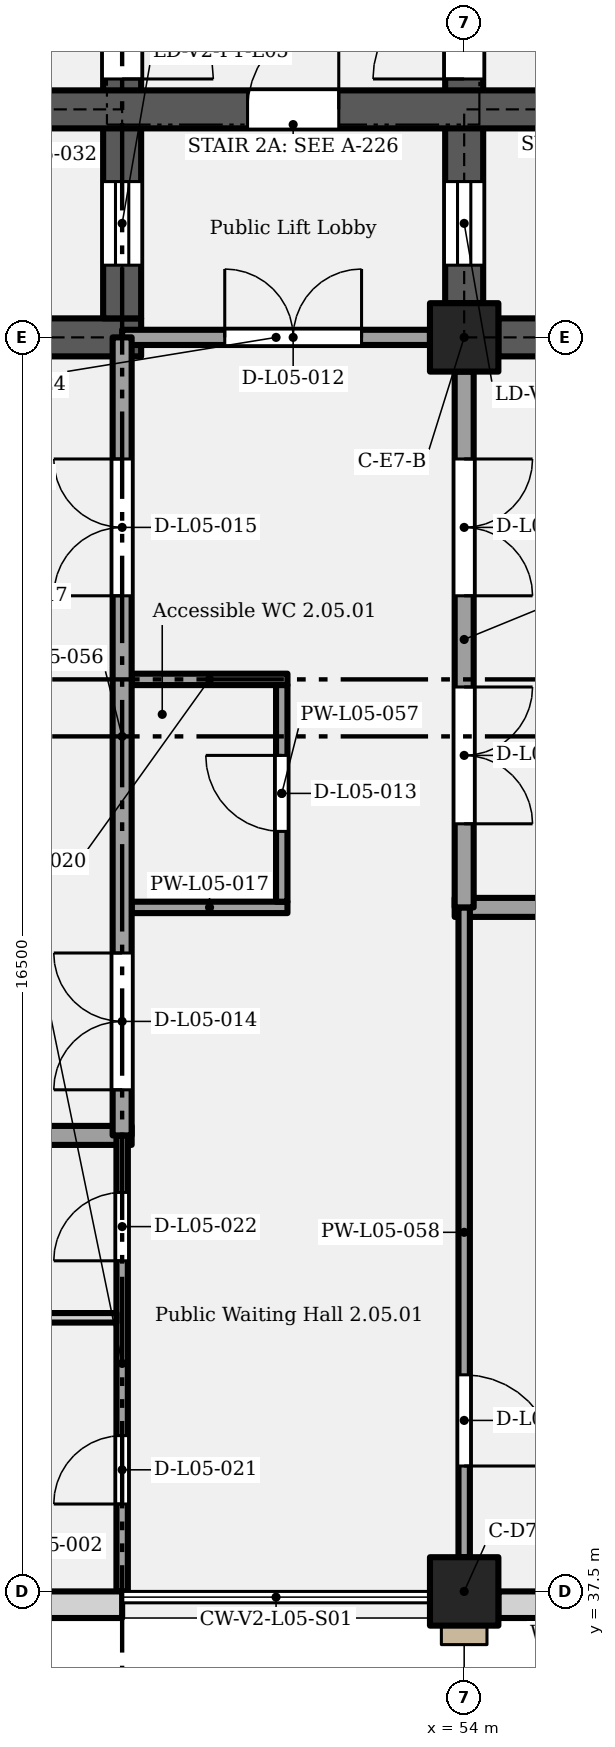
"""IFC4 building model, lengths in metres.
Left out: names, types, materials, properties, quantities, classifications, styles, units other than length and angle.
Written with IfcOpenShell. Run it as: python <this file> out.ifc"""

import sys

from ifc_helpers import new_model, si_unit, direction, frame, frame_2d, origin, origin_2d, place, context, subcontext, project, spatial, rectangle, extrude, element, fill, save


model = new_model("IFC4")
c1 = context("Model", 3, precision=1e-05, world=origin(), true_north=direction((0.0, 1.0)))
c2 = subcontext(c1, "Body", "Model", "MODEL_VIEW")
j1 = project(units=[si_unit("LENGTHUNIT", "METRE"), si_unit("PLANEANGLEUNIT", "RADIAN")], contexts=[c1])
p1 = place(None, origin())
s1 = spatial("IfcSite", under=j1, at=p1, CompositionType="ELEMENT")
p2 = place(p1, origin())
s2 = spatial("IfcBuilding", under=s1, at=p2, CompositionType="ELEMENT")
p3 = place(p2, frame((0.0, 0.0, 28.2)))
s3 = spatial("IfcBuildingStorey", under=s2, at=p3, CompositionType="ELEMENT", Elevation=28.2)
for number, where, z_axis, x_axis in (
    (1, (54.0, 37.5, 0.0), (0.0, 0.0, 1.0), (1.0, 0.0, 0.0)),
    (2, (54.0, 54.0, 0.0), (0.0, 0.0, 1.0), (1.0, 0.0, 0.0)),
):
    element("IfcColumn", number, at=place(p3, frame(where, z_axis=z_axis, x_axis=x_axis)), inside=s3, PredefinedType="COLUMN", context=c2, shape_type="SweptSolid", body=[
        extrude(rectangle(XDim=0.9, YDim=0.9, at=origin_2d()), origin(), (0.0, 0.0, 1.0), 5.4),
    ])
p4 = place(p3, frame((46.25, 54.0, 0.0), z_axis=(0.0, 0.0, 1.0), x_axis=(1.0, 0.0, 0.0)))
e3 = element("IfcWall", 3, at=p4, inside=s3, PredefinedType="SHEAR", context=c2, shape_type="SweptSolid", body=[
    extrude(rectangle(XDim=3.5, YDim=0.5, at=frame_2d((1.75, 0.0))), origin(), (0.0, 0.0, 1.0), 5.15),
])
p5 = place(p3, frame((54.45, 54.0, 0.0), z_axis=(0.0, 0.0, 1.0), x_axis=(1.0, 0.0, 0.0)))
e4 = element("IfcWall", 4, at=p5, inside=s3, PredefinedType="SHEAR", context=c2, shape_type="SweptSolid", body=[
    extrude(rectangle(XDim=2.8, YDim=0.5, at=frame_2d((1.4, 0.0))), origin(), (0.0, 0.0, 1.0), 5.15),
])
p6 = place(p3, frame((49.5, 54.25, 0.0), z_axis=(0.0, 0.0, 1.0), x_axis=(0.0, 1.0, 0.0)))
e5 = element("IfcWall", 5, at=p6, inside=s3, PredefinedType="SHEAR", context=c2, shape_type="SweptSolid", body=[
    extrude(rectangle(XDim=11.5, YDim=0.5, at=frame_2d((5.75, 0.0))), origin(), (0.0, 0.0, 1.0), 5.15),
])
p7 = place(p6, frame((0.7, 0.0, 0.0)))
e6 = element("IfcOpeningElement", 6, at=p7, cuts=e5, PredefinedType="OPENING", context=c2, shape_type="SweptSolid", body=[
    extrude(rectangle(XDim=1.1, YDim=2.1, at=frame_2d((0.55, 1.05))), frame((0.0, 0.26, 0.0), z_axis=(0.0, -1.0, 0.0), x_axis=(1.0, 0.0, 0.0)), (0.0, 0.0, 1.0), 0.52),
])
p8 = place(p6, frame((4.35, 0.0, 0.0), z_axis=(0.0, 0.0, 1.0), x_axis=(-1.0, 0.0, 0.0)))
e7 = element("IfcOpeningElement", 7, at=p8, cuts=e5, PredefinedType="OPENING", context=c2, shape_type="SweptSolid", body=[
    extrude(rectangle(XDim=1.2, YDim=2.1, at=frame_2d((0.6, 1.05))), frame((0.0, 0.26, 0.0), z_axis=(0.0, -1.0, 0.0), x_axis=(1.0, 0.0, 0.0)), (0.0, 0.0, 1.0), 0.52),
])
p9 = place(p3, frame((54.0, 54.45, 0.0), z_axis=(0.0, 0.0, 1.0), x_axis=(0.0, 1.0, 0.0)))
e8 = element("IfcWall", 8, at=p9, inside=s3, PredefinedType="SHEAR", context=c2, shape_type="SweptSolid", body=[
    extrude(rectangle(XDim=11.1, YDim=0.5, at=frame_2d((5.55, 0.0))), origin(), (0.0, 0.0, 1.0), 5.15),
])
p10 = place(p9, frame((0.5, 0.0, 0.0)))
e9 = element("IfcOpeningElement", 9, at=p10, cuts=e8, PredefinedType="OPENING", context=c2, shape_type="SweptSolid", body=[
    extrude(rectangle(XDim=1.1, YDim=2.1, at=frame_2d((0.55, 1.05))), frame((0.0, 0.26, 0.0), z_axis=(0.0, -1.0, 0.0), x_axis=(1.0, 0.0, 0.0)), (0.0, 0.0, 1.0), 0.52),
])
p11 = place(p9, frame((2.95, 0.0, 0.0)))
e10 = element("IfcOpeningElement", 10, at=p11, cuts=e8, PredefinedType="OPENING", context=c2, shape_type="SweptSolid", body=[
    extrude(rectangle(XDim=1.2, YDim=2.1, at=frame_2d((0.6, 1.05))), frame((0.0, 0.26, 0.0), z_axis=(0.0, -1.0, 0.0), x_axis=(1.0, 0.0, 0.0)), (0.0, 0.0, 1.0), 0.52),
])
p12 = place(p3, frame((46.25, 57.0, 0.0), z_axis=(0.0, 0.0, 1.0), x_axis=(1.0, 0.0, 0.0)))
e11 = element("IfcWall", 11, at=p12, inside=s3, PredefinedType="SHEAR", context=c2, shape_type="SweptSolid", body=[
    extrude(rectangle(XDim=11.0, YDim=0.5, at=frame_2d((5.5, 0.0))), origin(), (0.0, 0.0, 1.0), 5.15),
])
p13 = place(p12, frame((4.9, 0.0, 0.0)))
e12 = element("IfcOpeningElement", 12, at=p13, cuts=e11, PredefinedType="OPENING", context=c2, shape_type="SweptSolid", body=[
    extrude(rectangle(XDim=1.2, YDim=2.1, at=frame_2d((0.6, 1.05))), frame((0.0, 0.26, 0.0), z_axis=(0.0, -1.0, 0.0), x_axis=(1.0, 0.0, 0.0)), (0.0, 0.0, 1.0), 0.52),
])
p14 = place(p3, frame((45.45, 37.325, 0.0), z_axis=(0.0, 0.0, 1.0), x_axis=(1.0, 0.0, 0.0)))
e13 = element("IfcWall", 13, at=p14, inside=s3, PredefinedType="SOLIDWALL", context=c2, shape_type="SweptSolid", body=[
    extrude(rectangle(XDim=4.05, YDim=0.35, at=frame_2d((2.025, 0.0))), origin(), (0.0, 0.0, 1.0), 5.15),
])
p15 = place(p14, frame((1.05, 0.0, 1.05)))
e14 = element("IfcOpeningElement", 14, at=p15, cuts=e13, PredefinedType="OPENING", context=c2, shape_type="SweptSolid", body=[
    extrude(rectangle(XDim=1.5, YDim=3.5, at=frame_2d((0.75, 1.75))), frame((0.0, 0.185, 0.0), z_axis=(0.0, -1.0, 0.0), x_axis=(1.0, 0.0, 0.0)), (0.0, 0.0, 1.0), 0.37),
])
p16 = place(p3, frame((54.45, 37.325, 0.0), z_axis=(0.0, 0.0, 1.0), x_axis=(1.0, 0.0, 0.0)))
e15 = element("IfcWall", 15, at=p16, inside=s3, PredefinedType="SOLIDWALL", context=c2, shape_type="SweptSolid", body=[
    extrude(rectangle(XDim=8.1, YDim=0.35, at=frame_2d((4.05, 0.0))), origin(), (0.0, 0.0, 1.0), 5.15),
])
p17 = place(p16, frame((0.525, 0.0, 1.05)))
e16 = element("IfcOpeningElement", 16, at=p17, cuts=e15, PredefinedType="OPENING", context=c2, shape_type="SweptSolid", body=[
    extrude(rectangle(XDim=1.05, YDim=2.4, at=frame_2d((0.525, 1.2))), frame((0.0, 0.185, 0.0), z_axis=(0.0, -1.0, 0.0), x_axis=(1.0, 0.0, 0.0)), (0.0, 0.0, 1.0), 0.37),
])
p18 = place(p16, frame((3.525, 0.0, 1.05)))
e17 = element("IfcOpeningElement", 17, at=p18, cuts=e15, PredefinedType="OPENING", context=c2, shape_type="SweptSolid", body=[
    extrude(rectangle(XDim=1.05, YDim=2.4, at=frame_2d((0.525, 1.2))), frame((0.0, 0.185, 0.0), z_axis=(0.0, -1.0, 0.0), x_axis=(1.0, 0.0, 0.0)), (0.0, 0.0, 1.0), 0.37),
])
p19 = place(p16, frame((6.525, 0.0, 1.05)))
e18 = element("IfcOpeningElement", 18, at=p19, cuts=e15, PredefinedType="OPENING", context=c2, shape_type="SweptSolid", body=[
    extrude(rectangle(XDim=1.05, YDim=2.4, at=frame_2d((0.525, 1.2))), frame((0.0, 0.185, 0.0), z_axis=(0.0, -1.0, 0.0), x_axis=(1.0, 0.0, 0.0)), (0.0, 0.0, 1.0), 0.37),
])
p20 = place(p3, frame((45.15, 41.1, 0.0), z_axis=(0.0, 0.0, 1.0), x_axis=(1.0, 0.0, 0.0)))
e19 = element("IfcWall", 19, at=p20, inside=s3, PredefinedType="PARTITIONING", context=c2, shape_type="SweptSolid", body=[
    extrude(rectangle(XDim=4.275, YDim=0.125, at=frame_2d((2.138, 0.0))), origin(), (0.0, 0.0, 1.0), 5.15),
])
p21 = place(p3, frame((45.0, 43.5, 0.0), z_axis=(0.0, 0.0, 1.0), x_axis=(1.0, 0.0, 0.0)))
e20 = element("IfcWall", 20, at=p21, inside=s3, PredefinedType="PARTITIONING", context=c2, shape_type="SweptSolid", body=[
    extrude(rectangle(XDim=4.625, YDim=0.25, at=frame_2d((2.312, 0.0))), origin(), (0.0, 0.0, 1.0), 5.15),
])
p22 = place(p3, frame((49.625, 46.5, 0.0), z_axis=(0.0, 0.0, 1.0), x_axis=(1.0, 0.0, 0.0)))
e21 = element("IfcWall", 21, at=p22, inside=s3, PredefinedType="PARTITIONING", context=c2, shape_type="SweptSolid", body=[
    extrude(rectangle(XDim=2.05, YDim=0.15, at=frame_2d((1.025, 0.0))), origin(), (0.0, 0.0, 1.0), 5.15),
])
p23 = place(p3, frame((53.875, 46.5, 0.0), z_axis=(0.0, 0.0, 1.0), x_axis=(1.0, 0.0, 0.0)))
e22 = element("IfcWall", 22, at=p23, inside=s3, PredefinedType="PARTITIONING", context=c2, shape_type="SweptSolid", body=[
    extrude(rectangle(XDim=9.125, YDim=0.25, at=frame_2d((4.562, 0.0))), origin(), (0.0, 0.0, 1.0), 5.15),
])
p24 = place(p3, frame((49.625, 49.5, 0.0), z_axis=(0.0, 0.0, 1.0), x_axis=(1.0, 0.0, 0.0)))
e23 = element("IfcWall", 23, at=p24, inside=s3, PredefinedType="PARTITIONING", context=c2, shape_type="SweptSolid", body=[
    extrude(rectangle(XDim=2.05, YDim=0.15, at=frame_2d((1.025, 0.0))), origin(), (0.0, 0.0, 1.0), 5.15),
])
p25 = place(p3, frame((49.5, 54.0, 0.0), z_axis=(0.0, 0.0, 1.0), x_axis=(1.0, 0.0, 0.0)))
e24 = element("IfcWall", 24, at=p25, inside=s3, PredefinedType="PARTITIONING", context=c2, shape_type="SweptSolid", body=[
    extrude(rectangle(XDim=4.05, YDim=0.2, at=frame_2d((2.025, 0.0))), origin(), (0.0, 0.0, 1.0), 4.4),
])
p26 = place(p25, frame((1.35, 0.0, 0.0)))
e25 = element("IfcOpeningElement", 25, at=p26, cuts=e24, PredefinedType="OPENING", context=c2, shape_type="SweptSolid", body=[
    extrude(rectangle(XDim=1.8, YDim=2.1, at=frame_2d((0.9, 1.05))), frame((0.0, 0.11, 0.0), z_axis=(0.0, -1.0, 0.0), x_axis=(1.0, 0.0, 0.0)), (0.0, 0.0, 1.0), 0.22),
])
p27 = place(p3, frame((49.5, 37.5, 0.0), z_axis=(0.0, 0.0, 1.0), x_axis=(0.0, 1.0, 0.0)))
e26 = element("IfcWall", 26, at=p27, inside=s3, PredefinedType="PARTITIONING", context=c2, shape_type="SweptSolid", body=[
    extrude(rectangle(XDim=6.0, YDim=0.15, at=frame_2d((3.0, 0.0))), origin(), (0.0, 0.0, 1.0), 5.15),
])
p28 = place(p27, frame((1.15, 0.0, 0.0)))
e27 = element("IfcOpeningElement", 27, at=p28, cuts=e26, PredefinedType="OPENING", context=c2, shape_type="SweptSolid", body=[
    extrude(rectangle(XDim=0.9, YDim=2.1, at=frame_2d((0.45, 1.05))), frame((0.0, 0.085, 0.0), z_axis=(0.0, -1.0, 0.0), x_axis=(1.0, 0.0, 0.0)), (0.0, 0.0, 1.0), 0.17),
])
p29 = place(p27, frame((4.35, 0.0, 0.0)))
e28 = element("IfcOpeningElement", 28, at=p29, cuts=e26, PredefinedType="OPENING", context=c2, shape_type="SweptSolid", body=[
    extrude(rectangle(XDim=0.9, YDim=2.1, at=frame_2d((0.45, 1.05))), frame((0.0, 0.085, 0.0), z_axis=(0.0, -1.0, 0.0), x_axis=(1.0, 0.0, 0.0)), (0.0, 0.0, 1.0), 0.17),
])
p30 = place(p3, frame((49.5, 43.5, 0.0), z_axis=(0.0, 0.0, 1.0), x_axis=(0.0, 1.0, 0.0)))
e29 = element("IfcWall", 29, at=p30, inside=s3, PredefinedType="PARTITIONING", context=c2, shape_type="SweptSolid", body=[
    extrude(rectangle(XDim=10.5, YDim=0.25, at=frame_2d((5.25, 0.0))), origin(), (0.0, 0.0, 1.0), 5.15),
])
p31 = place(p30, frame((0.6, 0.0, 0.0)))
e30 = element("IfcOpeningElement", 30, at=p31, cuts=e29, PredefinedType="OPENING", context=c2, shape_type="SweptSolid", body=[
    extrude(rectangle(XDim=1.8, YDim=2.4, at=frame_2d((0.9, 1.2))), frame((0.0, 0.135, 0.0), z_axis=(0.0, -1.0, 0.0), x_axis=(1.0, 0.0, 0.0)), (0.0, 0.0, 1.0), 0.27),
])
p32 = place(p30, frame((7.1, 0.0, 0.0)))
e31 = element("IfcOpeningElement", 31, at=p32, cuts=e29, PredefinedType="OPENING", context=c2, shape_type="SweptSolid", body=[
    extrude(rectangle(XDim=1.8, YDim=2.4, at=frame_2d((0.9, 1.2))), frame((0.0, 0.135, 0.0), z_axis=(0.0, -1.0, 0.0), x_axis=(1.0, 0.0, 0.0)), (0.0, 0.0, 1.0), 0.27),
])
p33 = place(p3, frame((51.6, 46.575, 0.0), z_axis=(0.0, 0.0, 1.0), x_axis=(0.0, 1.0, 0.0)))
e32 = element("IfcWall", 32, at=p33, inside=s3, PredefinedType="PARTITIONING", context=c2, shape_type="SweptSolid", body=[
    extrude(rectangle(XDim=2.85, YDim=0.15, at=frame_2d((1.425, 0.0))), origin(), (0.0, 0.0, 1.0), 5.15),
])
p34 = place(p33, frame((0.925, 0.0, 0.0)))
e33 = element("IfcOpeningElement", 33, at=p34, cuts=e32, PredefinedType="OPENING", context=c2, shape_type="SweptSolid", body=[
    extrude(rectangle(XDim=1.0, YDim=2.1, at=frame_2d((0.5, 1.05))), frame((0.0, 0.085, 0.0), z_axis=(0.0, -1.0, 0.0), x_axis=(1.0, 0.0, 0.0)), (0.0, 0.0, 1.0), 0.17),
])
p35 = place(p3, frame((54.0, 37.95, 0.0), z_axis=(0.0, 0.0, 1.0), x_axis=(0.0, 1.0, 0.0)))
e34 = element("IfcWall", 34, at=p35, inside=s3, PredefinedType="PARTITIONING", context=c2, shape_type="SweptSolid", body=[
    extrude(rectangle(XDim=8.55, YDim=0.15, at=frame_2d((4.275, 0.0))), origin(), (0.0, 0.0, 1.0), 4.2),
])
p36 = place(p35, frame((2.4, 0.0, 0.0), z_axis=(0.0, 0.0, 1.0), x_axis=(-1.0, 0.0, 0.0)))
e35 = element("IfcOpeningElement", 35, at=p36, cuts=e34, PredefinedType="OPENING", context=c2, shape_type="SweptSolid", body=[
    extrude(rectangle(XDim=1.2, YDim=2.1, at=frame_2d((0.6, 1.05))), frame((0.0, 0.085, 0.0), z_axis=(0.0, -1.0, 0.0), x_axis=(1.0, 0.0, 0.0)), (0.0, 0.0, 1.0), 0.17),
])
p37 = place(p3, frame((54.0, 46.5, 0.0), z_axis=(0.0, 0.0, 1.0), x_axis=(0.0, 1.0, 0.0)))
e36 = element("IfcWall", 36, at=p37, inside=s3, PredefinedType="PARTITIONING", context=c2, shape_type="SweptSolid", body=[
    extrude(rectangle(XDim=7.05, YDim=0.25, at=frame_2d((3.525, 0.0))), origin(), (0.0, 0.0, 1.0), 4.2),
])
p38 = place(p37, frame((2.9, 0.0, 0.0), z_axis=(0.0, 0.0, 1.0), x_axis=(-1.0, 0.0, 0.0)))
e37 = element("IfcOpeningElement", 37, at=p38, cuts=e36, PredefinedType="OPENING", context=c2, shape_type="SweptSolid", body=[
    extrude(rectangle(XDim=1.8, YDim=2.4, at=frame_2d((0.9, 1.2))), frame((0.0, 0.135, 0.0), z_axis=(0.0, -1.0, 0.0), x_axis=(1.0, 0.0, 0.0)), (0.0, 0.0, 1.0), 0.27),
])
p39 = place(p37, frame((5.9, 0.0, 0.0), z_axis=(0.0, 0.0, 1.0), x_axis=(-1.0, 0.0, 0.0)))
e38 = element("IfcOpeningElement", 38, at=p39, cuts=e36, PredefinedType="OPENING", context=c2, shape_type="SweptSolid", body=[
    extrude(rectangle(XDim=1.8, YDim=2.4, at=frame_2d((0.9, 1.2))), frame((0.0, 0.135, 0.0), z_axis=(0.0, -1.0, 0.0), x_axis=(1.0, 0.0, 0.0)), (0.0, 0.0, 1.0), 0.27),
])
p40 = place(p7, origin())
e39 = element("IfcDoor", 39, at=p40, inside=s3, OperationType="SLIDING_TO_LEFT", PredefinedType="DOOR", context=c2, shape_type="SweptSolid", body=[
    extrude(rectangle(XDim=1.1, YDim=2.1, at=frame_2d((0.55, 1.05))), frame((0.0, 0.025, 0.0), z_axis=(0.0, -1.0, 0.0), x_axis=(1.0, 0.0, 0.0)), (0.0, 0.0, 1.0), 0.05),
])
fill(e6, e39)
p41 = place(p10, origin())
e40 = element("IfcDoor", 40, at=p41, inside=s3, OperationType="SLIDING_TO_LEFT", PredefinedType="DOOR", context=c2, shape_type="SweptSolid", body=[
    extrude(rectangle(XDim=1.1, YDim=2.1, at=frame_2d((0.55, 1.05))), frame((0.0, 0.025, 0.0), z_axis=(0.0, -1.0, 0.0), x_axis=(1.0, 0.0, 0.0)), (0.0, 0.0, 1.0), 0.05),
])
fill(e9, e40)
p42 = place(p13, origin())
e41 = element("IfcDoor", 41, at=p42, inside=s3, OperationType="SINGLE_SWING_RIGHT", PredefinedType="DOOR", context=c2, shape_type="SweptSolid", body=[
    extrude(rectangle(XDim=1.2, YDim=2.1, at=frame_2d((0.6, 1.05))), frame((0.0, 0.025, 0.0), z_axis=(0.0, -1.0, 0.0), x_axis=(1.0, 0.0, 0.0)), (0.0, 0.0, 1.0), 0.05),
])
fill(e12, e41)
p43 = place(p11, origin())
e42 = element("IfcDoor", 42, at=p43, inside=s3, OperationType="SINGLE_SWING_LEFT", PredefinedType="DOOR", context=c2, shape_type="SweptSolid", body=[
    extrude(rectangle(XDim=1.2, YDim=2.1, at=frame_2d((0.6, 1.05))), frame((0.0, 0.025, 0.0), z_axis=(0.0, -1.0, 0.0), x_axis=(1.0, 0.0, 0.0)), (0.0, 0.0, 1.0), 0.05),
])
fill(e10, e42)
p44 = place(p8, origin())
e43 = element("IfcDoor", 43, at=p44, inside=s3, OperationType="SINGLE_SWING_RIGHT", PredefinedType="DOOR", context=c2, shape_type="SweptSolid", body=[
    extrude(rectangle(XDim=1.2, YDim=2.1, at=frame_2d((0.6, 1.05))), frame((0.0, 0.025, 0.0), z_axis=(0.0, -1.0, 0.0), x_axis=(1.0, 0.0, 0.0)), (0.0, 0.0, 1.0), 0.05),
])
fill(e7, e43)
p45 = place(p26, origin())
e44 = element("IfcDoor", 44, at=p45, inside=s3, OperationType="DOUBLE_DOOR_SINGLE_SWING", PredefinedType="DOOR", context=c2, shape_type="SweptSolid", body=[
    extrude(rectangle(XDim=1.8, YDim=2.1, at=frame_2d((0.9, 1.05))), frame((0.0, 0.025, 0.0), z_axis=(0.0, -1.0, 0.0), x_axis=(1.0, 0.0, 0.0)), (0.0, 0.0, 1.0), 0.05),
])
fill(e25, e44)
p46 = place(p34, origin())
e45 = element("IfcDoor", 45, at=p46, inside=s3, OperationType="SINGLE_SWING_RIGHT", PredefinedType="DOOR", context=c2, shape_type="SweptSolid", body=[
    extrude(rectangle(XDim=1.0, YDim=2.1, at=frame_2d((0.5, 1.05))), frame((0.0, 0.025, 0.0), z_axis=(0.0, -1.0, 0.0), x_axis=(1.0, 0.0, 0.0)), (0.0, 0.0, 1.0), 0.05),
])
fill(e33, e45)
p47 = place(p31, origin())
e46 = element("IfcDoor", 46, at=p47, inside=s3, OperationType="DOUBLE_DOOR_SINGLE_SWING", PredefinedType="DOOR", context=c2, shape_type="SweptSolid", body=[
    extrude(rectangle(XDim=1.8, YDim=2.4, at=frame_2d((0.9, 1.2))), frame((0.0, 0.025, 0.0), z_axis=(0.0, -1.0, 0.0), x_axis=(1.0, 0.0, 0.0)), (0.0, 0.0, 1.0), 0.05),
])
fill(e30, e46)
p48 = place(p32, origin())
e47 = element("IfcDoor", 47, at=p48, inside=s3, OperationType="DOUBLE_DOOR_SINGLE_SWING", PredefinedType="DOOR", context=c2, shape_type="SweptSolid", body=[
    extrude(rectangle(XDim=1.8, YDim=2.4, at=frame_2d((0.9, 1.2))), frame((0.0, 0.025, 0.0), z_axis=(0.0, -1.0, 0.0), x_axis=(1.0, 0.0, 0.0)), (0.0, 0.0, 1.0), 0.05),
])
fill(e31, e47)
p49 = place(p28, origin())
e48 = element("IfcDoor", 48, at=p49, inside=s3, OperationType="SINGLE_SWING_LEFT", PredefinedType="DOOR", context=c2, shape_type="SweptSolid", body=[
    extrude(rectangle(XDim=0.9, YDim=2.1, at=frame_2d((0.45, 1.05))), frame((0.0, 0.025, 0.0), z_axis=(0.0, -1.0, 0.0), x_axis=(1.0, 0.0, 0.0)), (0.0, 0.0, 1.0), 0.05),
])
fill(e27, e48)
p50 = place(p29, origin())
e49 = element("IfcDoor", 49, at=p50, inside=s3, OperationType="SINGLE_SWING_LEFT", PredefinedType="DOOR", context=c2, shape_type="SweptSolid", body=[
    extrude(rectangle(XDim=0.9, YDim=2.1, at=frame_2d((0.45, 1.05))), frame((0.0, 0.025, 0.0), z_axis=(0.0, -1.0, 0.0), x_axis=(1.0, 0.0, 0.0)), (0.0, 0.0, 1.0), 0.05),
])
fill(e28, e49)
p51 = place(p36, origin())
e50 = element("IfcDoor", 50, at=p51, inside=s3, OperationType="SINGLE_SWING_RIGHT", PredefinedType="DOOR", context=c2, shape_type="SweptSolid", body=[
    extrude(rectangle(XDim=1.2, YDim=2.1, at=frame_2d((0.6, 1.05))), frame((0.0, 0.025, 0.0), z_axis=(0.0, -1.0, 0.0), x_axis=(1.0, 0.0, 0.0)), (0.0, 0.0, 1.0), 0.05),
])
fill(e35, e50)
p52 = place(p38, origin())
e51 = element("IfcDoor", 51, at=p52, inside=s3, OperationType="DOUBLE_DOOR_SINGLE_SWING", PredefinedType="DOOR", context=c2, shape_type="SweptSolid", body=[
    extrude(rectangle(XDim=1.8, YDim=2.4, at=frame_2d((0.9, 1.2))), frame((0.0, 0.025, 0.0), z_axis=(0.0, -1.0, 0.0), x_axis=(1.0, 0.0, 0.0)), (0.0, 0.0, 1.0), 0.05),
])
fill(e37, e51)
p53 = place(p39, origin())
e52 = element("IfcDoor", 52, at=p53, inside=s3, OperationType="DOUBLE_DOOR_SINGLE_SWING", PredefinedType="DOOR", context=c2, shape_type="SweptSolid", body=[
    extrude(rectangle(XDim=1.8, YDim=2.4, at=frame_2d((0.9, 1.2))), frame((0.0, 0.025, 0.0), z_axis=(0.0, -1.0, 0.0), x_axis=(1.0, 0.0, 0.0)), (0.0, 0.0, 1.0), 0.05),
])
fill(e38, e52)
save(model, sys.argv[1])
